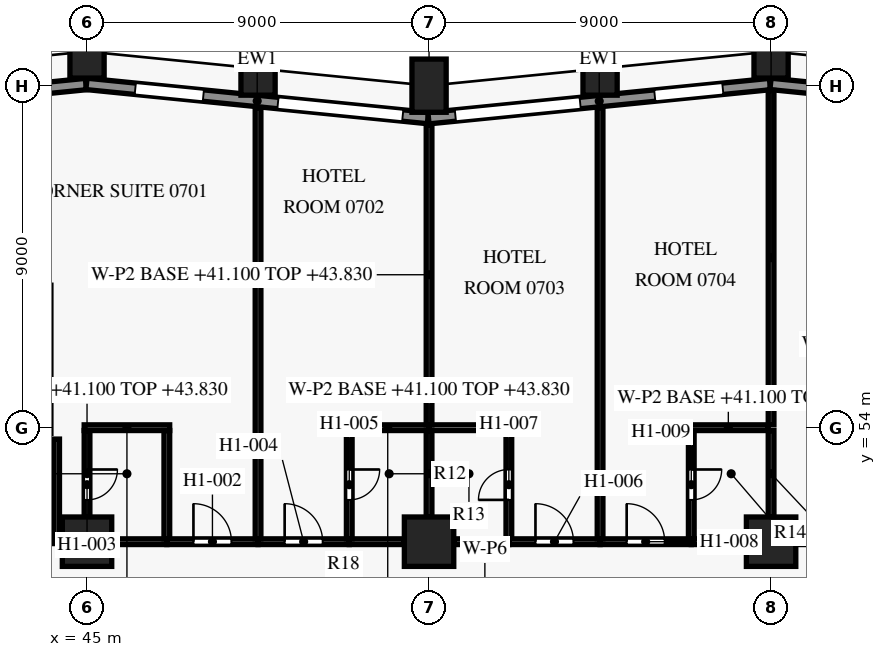
"""IFC4 building model, lengths in metres.
Left out: names, types, materials, properties, quantities, classifications, styles, units other than length and angle.
Written with IfcOpenShell. Run it as: python <this file> out.ifc"""

import sys

from ifc_helpers import new_model, si_unit, direction, frame, frame_2d, origin, origin_2d, place, context, subcontext, project, spatial, rectangle, extrude, element, fill, save


model = new_model("IFC4")
c1 = context("Model", 3, precision=1e-05, world=origin(), true_north=direction((0.0, 1.0)))
c2 = subcontext(c1, "Body", "Model", "MODEL_VIEW")
j1 = project(units=[si_unit("LENGTHUNIT", "METRE"), si_unit("PLANEANGLEUNIT", "RADIAN")], contexts=[c1])
p1 = place(None, origin())
s1 = spatial("IfcSite", under=j1, at=p1, CompositionType="ELEMENT")
p2 = place(p1, origin())
s2 = spatial("IfcBuilding", under=s1, at=p2, CompositionType="ELEMENT")
p3 = place(p2, frame((0.0, 0.0, 41.1)))
s3 = spatial("IfcBuildingStorey", under=s2, at=p3, CompositionType="ELEMENT", Elevation=41.1)
for number, where, z_axis, x_axis in (
    (1, (63.0, 63.9, 0.0), (0.0, 0.0, 1.0), (-1.0, 0.0, 0.0)),
    (2, (58.5, 63.45, 0.0), (0.0, 0.0, 1.0), (-0.995, -0.1, 0.0)),
    (3, (54.0, 63.0, 0.0), (0.0, 0.0, 1.0), (-1.0, 0.0, 0.0)),
    (4, (49.5, 63.45, 0.0), (0.0, 0.0, 1.0), (-0.995, 0.1, 0.0)),
    (5, (45.0, 63.9, 0.0), (0.0, 0.0, 1.0), (-1.0, 0.0, 0.0)),
):
    element("IfcColumn", number, at=place(p3, frame(where, z_axis=z_axis, x_axis=x_axis)), inside=s3, PredefinedType="COLUMN", context=c2, shape_type="SweptSolid", body=[
        extrude(rectangle(XDim=0.9, YDim=1.4, at=origin_2d()), origin(), (0.0, 0.0, 1.0), 3.6),
    ])
for number, where, z_axis, x_axis in (
    (6, (45.0, 51.0, 0.0), (0.0, 0.0, 1.0), (1.0, 0.0, 0.0)),
    (7, (54.0, 51.0, 0.0), (0.0, 0.0, 1.0), (1.0, 0.0, 0.0)),
    (8, (63.0, 51.0, 0.0), (0.0, 0.0, 1.0), (1.0, 0.0, 0.0)),
):
    element("IfcColumn", number, at=place(p3, frame(where, z_axis=z_axis, x_axis=x_axis)), inside=s3, PredefinedType="COLUMN", context=c2, shape_type="SweptSolid", body=[
        extrude(rectangle(XDim=1.3, YDim=1.3, at=origin_2d()), origin(), (0.0, 0.0, 1.0), 3.6),
    ])
p4 = place(p3, frame((62.985, 63.047, 0.0), z_axis=(0.0, 0.0, 1.0), x_axis=(0.995031712439, -0.099558481511, 0.0)))
e9 = element("IfcWall", 9, at=p4, inside=s3, PredefinedType="SOLIDWALL", context=c2, shape_type="SweptSolid", body=[
    extrude(rectangle(XDim=3.531, YDim=0.3, at=frame_2d((1.766, 0.0))), origin(), (0.0, 0.0, 1.0), 2.95),
])
p5 = place(p4, frame((1.291, 0.0, 0.75)))
e10 = element("IfcOpeningElement", 10, at=p5, cuts=e9, PredefinedType="OPENING", context=c2, shape_type="SweptSolid", body=[
    extrude(rectangle(XDim=1.8, YDim=1.8, at=frame_2d((0.9, 0.9))), frame((0.0, 0.16, 0.0), z_axis=(0.0, -1.0, 0.0), x_axis=(1.0, 0.0, 0.0)), (0.0, 0.0, 1.0), 0.32),
])
p6 = place(p3, frame((53.985, 62.144, 0.0), z_axis=(0.0, 0.0, 1.0), x_axis=(0.995037993253, 0.099495688264, 0.0)))
e11 = element("IfcWall", 11, at=p6, inside=s3, PredefinedType="SOLIDWALL", context=c2, shape_type="SweptSolid", body=[
    extrude(rectangle(XDim=9.03, YDim=0.3, at=frame_2d((4.515, 0.0))), origin(), (0.0, 0.0, 1.0), 2.95),
])
p7 = place(p6, frame((0.711, 0.0, 0.15)))
e12 = element("IfcOpeningElement", 12, at=p7, cuts=e11, PredefinedType="OPENING", context=c2, shape_type="SweptSolid", body=[
    extrude(rectangle(XDim=3.3, YDim=2.4, at=frame_2d((1.65, 1.2))), frame((0.0, 0.16, 0.0), z_axis=(0.0, -1.0, 0.0), x_axis=(1.0, 0.0, 0.0)), (0.0, 0.0, 1.0), 0.32),
])
p8 = place(p6, frame((5.984, 0.0, 0.75)))
e13 = element("IfcOpeningElement", 13, at=p8, cuts=e11, PredefinedType="OPENING", context=c2, shape_type="SweptSolid", body=[
    extrude(rectangle(XDim=1.8, YDim=1.8, at=frame_2d((0.9, 0.9))), frame((0.0, 0.16, 0.0), z_axis=(0.0, -1.0, 0.0), x_axis=(1.0, 0.0, 0.0)), (0.0, 0.0, 1.0), 0.32),
])
p9 = place(p3, frame((44.985, 63.047, 0.0), z_axis=(0.0, 0.0, 1.0), x_axis=(0.995035316196, -0.099522457379, 0.0)))
e14 = element("IfcWall", 14, at=p9, inside=s3, PredefinedType="SOLIDWALL", context=c2, shape_type="SweptSolid", body=[
    extrude(rectangle(XDim=9.03, YDim=0.3, at=frame_2d((4.515, 0.0))), origin(), (0.0, 0.0, 1.0), 2.95),
])
p10 = place(p9, frame((1.291, 0.0, 0.75)))
e15 = element("IfcOpeningElement", 15, at=p10, cuts=e14, PredefinedType="OPENING", context=c2, shape_type="SweptSolid", body=[
    extrude(rectangle(XDim=1.8, YDim=1.8, at=frame_2d((0.9, 0.9))), frame((0.0, 0.16, 0.0), z_axis=(0.0, -1.0, 0.0), x_axis=(1.0, 0.0, 0.0)), (0.0, 0.0, 1.0), 0.32),
])
p11 = place(p9, frame((5.064, 0.0, 0.15)))
e16 = element("IfcOpeningElement", 16, at=p11, cuts=e14, PredefinedType="OPENING", context=c2, shape_type="SweptSolid", body=[
    extrude(rectangle(XDim=3.3, YDim=2.4, at=frame_2d((1.65, 1.2))), frame((0.0, 0.16, 0.0), z_axis=(0.0, -1.0, 0.0), x_axis=(1.0, 0.0, 0.0)), (0.0, 0.0, 1.0), 0.32),
])
p12 = place(p3, frame((35.985, 62.144, 0.0), z_axis=(0.0, 0.0, 1.0), x_axis=(0.995037993253, 0.099495688264, 0.0)))
e17 = element("IfcWall", 17, at=p12, inside=s3, PredefinedType="SOLIDWALL", context=c2, shape_type="SweptSolid", body=[
    extrude(rectangle(XDim=9.03, YDim=0.3, at=frame_2d((4.515, 0.0))), origin(), (0.0, 0.0, 1.0), 2.95),
])
p13 = place(p12, frame((0.711, 0.0, 0.15)))
e18 = element("IfcOpeningElement", 18, at=p13, cuts=e17, PredefinedType="OPENING", context=c2, shape_type="SweptSolid", body=[
    extrude(rectangle(XDim=3.3, YDim=2.4, at=frame_2d((1.65, 1.2))), frame((0.0, 0.16, 0.0), z_axis=(0.0, -1.0, 0.0), x_axis=(1.0, 0.0, 0.0)), (0.0, 0.0, 1.0), 0.32),
])
p14 = place(p12, frame((5.984, 0.0, 0.75)))
e19 = element("IfcOpeningElement", 19, at=p14, cuts=e17, PredefinedType="OPENING", context=c2, shape_type="SweptSolid", body=[
    extrude(rectangle(XDim=1.8, YDim=1.8, at=frame_2d((0.9, 0.9))), frame((0.0, 0.16, 0.0), z_axis=(0.0, -1.0, 0.0), x_axis=(1.0, 0.0, 0.0)), (0.0, 0.0, 1.0), 0.32),
])
p15 = place(p3, frame((44.33, 51.0, 0.0), z_axis=(0.0, 0.0, 1.0), x_axis=(-1.0, 0.0, 0.0)))
e20 = element("IfcWall", 20, at=p15, inside=s3, PredefinedType="PARTITIONING", context=c2, shape_type="SweptSolid", body=[
    extrude(rectangle(XDim=3.83, YDim=0.1, at=frame_2d((1.915, 0.0))), origin(), (0.0, 0.0, 1.0), 2.58),
])
p16 = place(p3, frame((45.655, 51.0, 0.0), z_axis=(0.0, 0.0, 1.0), x_axis=(1.0, 0.0, 0.0)))
e21 = element("IfcWall", 21, at=p16, inside=s3, PredefinedType="PARTITIONING", context=c2, shape_type="SweptSolid", body=[
    extrude(rectangle(XDim=1.445, YDim=0.15, at=frame_2d((0.723, 0.0))), origin(), (0.0, 0.0, 1.0), 2.58),
])
p17 = place(p3, frame((47.1, 51.0, 0.0), z_axis=(0.0, 0.0, 1.0), x_axis=(1.0, 0.0, 0.0)))
e22 = element("IfcWall", 22, at=p17, inside=s3, PredefinedType="PARTITIONING", context=c2, shape_type="SweptSolid", body=[
    extrude(rectangle(XDim=2.4, YDim=0.15, at=frame_2d((1.2, 0.0))), origin(), (0.0, 0.0, 1.0), 2.58),
])
p18 = place(p17, frame((0.7, 0.0, 0.0)))
e23 = element("IfcOpeningElement", 23, at=p18, cuts=e22, PredefinedType="OPENING", context=c2, shape_type="SweptSolid", body=[
    extrude(rectangle(XDim=1.0, YDim=2.1, at=frame_2d((0.5, 1.05))), frame((0.0, 0.085, 0.0), z_axis=(0.0, -1.0, 0.0), x_axis=(1.0, 0.0, 0.0)), (0.0, 0.0, 1.0), 0.17),
])
p19 = place(p3, frame((49.5, 51.0, 0.0), z_axis=(0.0, 0.0, 1.0), x_axis=(1.0, 0.0, 0.0)))
e24 = element("IfcWall", 24, at=p19, inside=s3, PredefinedType="PARTITIONING", context=c2, shape_type="SweptSolid", body=[
    extrude(rectangle(XDim=2.4, YDim=0.15, at=frame_2d((1.2, 0.0))), origin(), (0.0, 0.0, 1.0), 2.58),
])
p20 = place(p19, frame((0.7, 0.0, 0.0)))
e25 = element("IfcOpeningElement", 25, at=p20, cuts=e24, PredefinedType="OPENING", context=c2, shape_type="SweptSolid", body=[
    extrude(rectangle(XDim=1.0, YDim=2.1, at=frame_2d((0.5, 1.05))), frame((0.0, 0.085, 0.0), z_axis=(0.0, -1.0, 0.0), x_axis=(1.0, 0.0, 0.0)), (0.0, 0.0, 1.0), 0.17),
])
for number, where, z_axis, x_axis in (
    (26, (51.9, 51.0, 0.0), (0.0, 0.0, 1.0), (1.0, 0.0, 0.0)),
    (27, (54.655, 51.0, 0.0), (0.0, 0.0, 1.0), (1.0, 0.0, 0.0)),
):
    element("IfcWall", number, at=place(p3, frame(where, z_axis=z_axis, x_axis=x_axis)), inside=s3, PredefinedType="PARTITIONING", context=c2, shape_type="SweptSolid", body=[
        extrude(rectangle(XDim=1.445, YDim=0.15, at=frame_2d((0.723, 0.0))), origin(), (0.0, 0.0, 1.0), 2.58),
    ])
p21 = place(p3, frame((56.1, 51.0, 0.0), z_axis=(0.0, 0.0, 1.0), x_axis=(1.0, 0.0, 0.0)))
e28 = element("IfcWall", 28, at=p21, inside=s3, PredefinedType="PARTITIONING", context=c2, shape_type="SweptSolid", body=[
    extrude(rectangle(XDim=2.4, YDim=0.15, at=frame_2d((1.2, 0.0))), origin(), (0.0, 0.0, 1.0), 2.58),
])
p22 = place(p21, frame((0.7, 0.0, 0.0)))
e29 = element("IfcOpeningElement", 29, at=p22, cuts=e28, PredefinedType="OPENING", context=c2, shape_type="SweptSolid", body=[
    extrude(rectangle(XDim=1.0, YDim=2.1, at=frame_2d((0.5, 1.05))), frame((0.0, 0.085, 0.0), z_axis=(0.0, -1.0, 0.0), x_axis=(1.0, 0.0, 0.0)), (0.0, 0.0, 1.0), 0.17),
])
p23 = place(p3, frame((58.5, 51.0, 0.0), z_axis=(0.0, 0.0, 1.0), x_axis=(1.0, 0.0, 0.0)))
e30 = element("IfcWall", 30, at=p23, inside=s3, PredefinedType="PARTITIONING", context=c2, shape_type="SweptSolid", body=[
    extrude(rectangle(XDim=2.4, YDim=0.15, at=frame_2d((1.2, 0.0))), origin(), (0.0, 0.0, 1.0), 2.58),
])
p24 = place(p23, frame((0.7, 0.0, 0.0)))
e31 = element("IfcOpeningElement", 31, at=p24, cuts=e30, PredefinedType="OPENING", context=c2, shape_type="SweptSolid", body=[
    extrude(rectangle(XDim=1.0, YDim=2.1, at=frame_2d((0.5, 1.05))), frame((0.0, 0.085, 0.0), z_axis=(0.0, -1.0, 0.0), x_axis=(1.0, 0.0, 0.0)), (0.0, 0.0, 1.0), 0.17),
])
p25 = place(p3, frame((60.9, 51.0, 0.0), z_axis=(0.0, 0.0, 1.0), x_axis=(1.0, 0.0, 0.0)))
e32 = element("IfcWall", 32, at=p25, inside=s3, PredefinedType="PARTITIONING", context=c2, shape_type="SweptSolid", body=[
    extrude(rectangle(XDim=1.445, YDim=0.15, at=frame_2d((0.723, 0.0))), origin(), (0.0, 0.0, 1.0), 2.58),
])
p26 = place(p3, frame((63.655, 51.0, 0.0), z_axis=(0.0, 0.0, 1.0), x_axis=(1.0, 0.0, 0.0)))
e33 = element("IfcWall", 33, at=p26, inside=s3, PredefinedType="PARTITIONING", context=c2, shape_type="SweptSolid", body=[
    extrude(rectangle(XDim=1.22, YDim=0.15, at=frame_2d((0.61, 0.0))), origin(), (0.0, 0.0, 1.0), 2.58),
])
p27 = place(p3, frame((47.1, 51.075, 0.0), z_axis=(0.0, 0.0, 1.0), x_axis=(0.0, 1.0, 0.0)))
e34 = element("IfcWall", 34, at=p27, inside=s3, PredefinedType="PARTITIONING", context=c2, shape_type="SweptSolid", body=[
    extrude(rectangle(XDim=2.85, YDim=0.15, at=frame_2d((1.425, 0.0))), origin(), (0.0, 0.0, 1.0), 2.58),
])
p28 = place(p3, frame((56.1, 51.075, 0.0), z_axis=(0.0, 0.0, 1.0), x_axis=(0.0, 1.0, 0.0)))
e35 = element("IfcWall", 35, at=p28, inside=s3, PredefinedType="PARTITIONING", context=c2, shape_type="SweptSolid", body=[
    extrude(rectangle(XDim=2.85, YDim=0.15, at=frame_2d((1.425, 0.0))), origin(), (0.0, 0.0, 1.0), 2.58),
])
p29 = place(p28, frame((1.025, 0.0, 0.0)))
e36 = element("IfcOpeningElement", 36, at=p29, cuts=e35, PredefinedType="OPENING", context=c2, shape_type="SweptSolid", body=[
    extrude(rectangle(XDim=0.8, YDim=2.1, at=frame_2d((0.4, 1.05))), frame((0.0, 0.085, 0.0), z_axis=(0.0, -1.0, 0.0), x_axis=(1.0, 0.0, 0.0)), (0.0, 0.0, 1.0), 0.17),
])
p30 = place(p3, frame((44.2, 53.7, 0.0), z_axis=(0.0, 0.0, 1.0), x_axis=(0.0, -1.0, 0.0)))
e37 = element("IfcWall", 37, at=p30, inside=s3, PredefinedType="PARTITIONING", context=c2, shape_type="SweptSolid", body=[
    extrude(rectangle(XDim=2.625, YDim=0.15, at=frame_2d((1.312, 0.0))), origin(), (0.0, 0.0, 1.0), 2.58),
])
p31 = place(p3, frame((45.0, 53.925, 0.0), z_axis=(0.0, 0.0, 1.0), x_axis=(0.0, -1.0, 0.0)))
e38 = element("IfcWall", 38, at=p31, inside=s3, PredefinedType="PARTITIONING", context=c2, shape_type="SweptSolid", body=[
    extrude(rectangle(XDim=2.27, YDim=0.15, at=frame_2d((1.135, 0.0))), origin(), (0.0, 0.0, 1.0), 2.73),
])
p32 = place(p31, frame((1.025, 0.0, 0.0)))
e39 = element("IfcOpeningElement", 39, at=p32, cuts=e38, PredefinedType="OPENING", context=c2, shape_type="SweptSolid", body=[
    extrude(rectangle(XDim=0.8, YDim=2.1, at=frame_2d((0.4, 1.05))), frame((0.0, 0.085, 0.0), z_axis=(0.0, -1.0, 0.0), x_axis=(1.0, 0.0, 0.0)), (0.0, 0.0, 1.0), 0.17),
])
p33 = place(p3, frame((51.9, 53.925, 0.0), z_axis=(0.0, 0.0, 1.0), x_axis=(0.0, -1.0, 0.0)))
e40 = element("IfcWall", 40, at=p33, inside=s3, PredefinedType="PARTITIONING", context=c2, shape_type="SweptSolid", body=[
    extrude(rectangle(XDim=2.85, YDim=0.15, at=frame_2d((1.425, 0.0))), origin(), (0.0, 0.0, 1.0), 2.58),
])
p34 = place(p33, frame((1.025, 0.0, 0.0)))
e41 = element("IfcOpeningElement", 41, at=p34, cuts=e40, PredefinedType="OPENING", context=c2, shape_type="SweptSolid", body=[
    extrude(rectangle(XDim=0.8, YDim=2.1, at=frame_2d((0.4, 1.05))), frame((0.0, 0.085, 0.0), z_axis=(0.0, -1.0, 0.0), x_axis=(1.0, 0.0, 0.0)), (0.0, 0.0, 1.0), 0.17),
])
p35 = place(p3, frame((54.0, 53.925, 0.0), z_axis=(0.0, 0.0, 1.0), x_axis=(0.0, -1.0, 0.0)))
e42 = element("IfcWall", 42, at=p35, inside=s3, PredefinedType="PARTITIONING", context=c2, shape_type="SweptSolid", body=[
    extrude(rectangle(XDim=2.27, YDim=0.15, at=frame_2d((1.135, 0.0))), origin(), (0.0, 0.0, 1.0), 2.73),
])
p36 = place(p3, frame((60.9, 53.925, 0.0), z_axis=(0.0, 0.0, 1.0), x_axis=(0.0, -1.0, 0.0)))
e43 = element("IfcWall", 43, at=p36, inside=s3, PredefinedType="PARTITIONING", context=c2, shape_type="SweptSolid", body=[
    extrude(rectangle(XDim=2.85, YDim=0.15, at=frame_2d((1.425, 0.0))), origin(), (0.0, 0.0, 1.0), 2.58),
])
p37 = place(p36, frame((1.025, 0.0, 0.0)))
e44 = element("IfcOpeningElement", 44, at=p37, cuts=e43, PredefinedType="OPENING", context=c2, shape_type="SweptSolid", body=[
    extrude(rectangle(XDim=0.8, YDim=2.1, at=frame_2d((0.4, 1.05))), frame((0.0, 0.085, 0.0), z_axis=(0.0, -1.0, 0.0), x_axis=(1.0, 0.0, 0.0)), (0.0, 0.0, 1.0), 0.17),
])
p38 = place(p3, frame((63.0, 53.925, 0.0), z_axis=(0.0, 0.0, 1.0), x_axis=(0.0, -1.0, 0.0)))
e45 = element("IfcWall", 45, at=p38, inside=s3, PredefinedType="PARTITIONING", context=c2, shape_type="SweptSolid", body=[
    extrude(rectangle(XDim=2.27, YDim=0.15, at=frame_2d((1.135, 0.0))), origin(), (0.0, 0.0, 1.0), 2.73),
])
p39 = place(p3, frame((47.175, 54.0, 0.0), z_axis=(0.0, 0.0, 1.0), x_axis=(-1.0, 0.0, 0.0)))
e46 = element("IfcWall", 46, at=p39, inside=s3, PredefinedType="PARTITIONING", context=c2, shape_type="SweptSolid", body=[
    extrude(rectangle(XDim=2.25, YDim=0.15, at=frame_2d((1.125, 0.0))), origin(), (0.0, 0.0, 1.0), 2.73),
])
for number, where, z_axis, x_axis in (
    (47, (54.0, 54.0, 0.0), (0.0, 0.0, 1.0), (-1.0, 0.0, 0.0)),
    (48, (56.175, 54.0, 0.0), (0.0, 0.0, 1.0), (-1.0, 0.0, 0.0)),
):
    element("IfcWall", number, at=place(p3, frame(where, z_axis=z_axis, x_axis=x_axis)), inside=s3, PredefinedType="PARTITIONING", context=c2, shape_type="SweptSolid", body=[
        extrude(rectangle(XDim=2.175, YDim=0.15, at=frame_2d((1.087, 0.0))), origin(), (0.0, 0.0, 1.0), 2.73),
    ])
p40 = place(p3, frame((62.925, 54.0, 0.0), z_axis=(0.0, 0.0, 1.0), x_axis=(-1.0, 0.0, 0.0)))
e49 = element("IfcWall", 49, at=p40, inside=s3, PredefinedType="PARTITIONING", context=c2, shape_type="SweptSolid", body=[
    extrude(rectangle(XDim=2.1, YDim=0.15, at=frame_2d((1.05, 0.0))), origin(), (0.0, 0.0, 1.0), 2.73),
])
p41 = place(p3, frame((54.0, 61.975, 0.0), z_axis=(0.0, 0.0, 1.0), x_axis=(0.0, -1.0, 0.0)))
e50 = element("IfcWall", 50, at=p41, inside=s3, PredefinedType="PARTITIONING", context=c2, shape_type="SweptSolid", body=[
    extrude(rectangle(XDim=7.9, YDim=0.15, at=frame_2d((3.95, 0.0))), origin(), (0.0, 0.0, 1.0), 2.73),
])
for number, where, z_axis, x_axis in (
    (51, (49.5, 62.425, 0.0), (0.0, 0.0, 1.0), (0.0, -1.0, 0.0)),
    (52, (58.5, 62.425, 0.0), (0.0, 0.0, 1.0), (0.0, -1.0, 0.0)),
):
    element("IfcWall", number, at=place(p3, frame(where, z_axis=z_axis, x_axis=x_axis)), inside=s3, PredefinedType="PARTITIONING", context=c2, shape_type="SweptSolid", body=[
        extrude(rectangle(XDim=11.35, YDim=0.15, at=frame_2d((5.675, 0.0))), origin(), (0.0, 0.0, 1.0), 2.58),
    ])
p42 = place(p3, frame((63.0, 62.875, 0.0), z_axis=(0.0, 0.0, 1.0), x_axis=(0.0, -1.0, 0.0)))
e53 = element("IfcWall", 53, at=p42, inside=s3, PredefinedType="PARTITIONING", context=c2, shape_type="SweptSolid", body=[
    extrude(rectangle(XDim=8.8, YDim=0.15, at=frame_2d((4.4, 0.0))), origin(), (0.0, 0.0, 1.0), 2.73),
])
p43 = place(p7, origin())
e54 = element("IfcWindow", 54, at=p43, inside=s3, PartitioningType="SINGLE_PANEL", PredefinedType="WINDOW", context=c2, shape_type="SweptSolid", body=[
    extrude(rectangle(XDim=3.3, YDim=2.4, at=frame_2d((1.65, 1.2))), frame((0.0, 0.03, 0.0), z_axis=(0.0, -1.0, 0.0), x_axis=(1.0, 0.0, 0.0)), (0.0, 0.0, 1.0), 0.06),
])
fill(e12, e54)
p44 = place(p8, origin())
e55 = element("IfcWindow", 55, at=p44, inside=s3, PartitioningType="SINGLE_PANEL", PredefinedType="WINDOW", context=c2, shape_type="SweptSolid", body=[
    extrude(rectangle(XDim=1.8, YDim=1.8, at=frame_2d((0.9, 0.9))), frame((0.0, 0.03, 0.0), z_axis=(0.0, -1.0, 0.0), x_axis=(1.0, 0.0, 0.0)), (0.0, 0.0, 1.0), 0.06),
])
fill(e13, e55)
p45 = place(p10, origin())
e56 = element("IfcWindow", 56, at=p45, inside=s3, PartitioningType="SINGLE_PANEL", PredefinedType="WINDOW", context=c2, shape_type="SweptSolid", body=[
    extrude(rectangle(XDim=1.8, YDim=1.8, at=frame_2d((0.9, 0.9))), frame((0.0, 0.03, 0.0), z_axis=(0.0, -1.0, 0.0), x_axis=(1.0, 0.0, 0.0)), (0.0, 0.0, 1.0), 0.06),
])
fill(e15, e56)
p46 = place(p11, origin())
e57 = element("IfcWindow", 57, at=p46, inside=s3, PartitioningType="SINGLE_PANEL", PredefinedType="WINDOW", context=c2, shape_type="SweptSolid", body=[
    extrude(rectangle(XDim=3.3, YDim=2.4, at=frame_2d((1.65, 1.2))), frame((0.0, 0.03, 0.0), z_axis=(0.0, -1.0, 0.0), x_axis=(1.0, 0.0, 0.0)), (0.0, 0.0, 1.0), 0.06),
])
fill(e16, e57)
p47 = place(p18, origin())
e58 = element("IfcDoor", 58, at=p47, inside=s3, OperationType="SINGLE_SWING_LEFT", PredefinedType="DOOR", context=c2, shape_type="SweptSolid", body=[
    extrude(rectangle(XDim=1.0, YDim=2.1, at=frame_2d((0.5, 1.05))), frame((0.0, 0.025, 0.0), z_axis=(0.0, -1.0, 0.0), x_axis=(1.0, 0.0, 0.0)), (0.0, 0.0, 1.0), 0.05),
])
fill(e23, e58)
p48 = place(p32, origin())
e59 = element("IfcDoor", 59, at=p48, inside=s3, OperationType="SINGLE_SWING_RIGHT", PredefinedType="DOOR", context=c2, shape_type="SweptSolid", body=[
    extrude(rectangle(XDim=0.8, YDim=2.1, at=frame_2d((0.4, 1.05))), frame((0.0, 0.025, 0.0), z_axis=(0.0, -1.0, 0.0), x_axis=(1.0, 0.0, 0.0)), (0.0, 0.0, 1.0), 0.05),
])
fill(e39, e59)
p49 = place(p20, origin())
e60 = element("IfcDoor", 60, at=p49, inside=s3, OperationType="SINGLE_SWING_LEFT", PredefinedType="DOOR", context=c2, shape_type="SweptSolid", body=[
    extrude(rectangle(XDim=1.0, YDim=2.1, at=frame_2d((0.5, 1.05))), frame((0.0, 0.025, 0.0), z_axis=(0.0, -1.0, 0.0), x_axis=(1.0, 0.0, 0.0)), (0.0, 0.0, 1.0), 0.05),
])
fill(e25, e60)
p50 = place(p34, origin())
e61 = element("IfcDoor", 61, at=p50, inside=s3, OperationType="SINGLE_SWING_LEFT", PredefinedType="DOOR", context=c2, shape_type="SweptSolid", body=[
    extrude(rectangle(XDim=0.8, YDim=2.1, at=frame_2d((0.4, 1.05))), frame((0.0, 0.025, 0.0), z_axis=(0.0, -1.0, 0.0), x_axis=(1.0, 0.0, 0.0)), (0.0, 0.0, 1.0), 0.05),
])
fill(e41, e61)
p51 = place(p22, origin())
e62 = element("IfcDoor", 62, at=p51, inside=s3, OperationType="SINGLE_SWING_LEFT", PredefinedType="DOOR", context=c2, shape_type="SweptSolid", body=[
    extrude(rectangle(XDim=1.0, YDim=2.1, at=frame_2d((0.5, 1.05))), frame((0.0, 0.025, 0.0), z_axis=(0.0, -1.0, 0.0), x_axis=(1.0, 0.0, 0.0)), (0.0, 0.0, 1.0), 0.05),
])
fill(e29, e62)
p52 = place(p29, origin())
e63 = element("IfcDoor", 63, at=p52, inside=s3, OperationType="SINGLE_SWING_LEFT", PredefinedType="DOOR", context=c2, shape_type="SweptSolid", body=[
    extrude(rectangle(XDim=0.8, YDim=2.1, at=frame_2d((0.4, 1.05))), frame((0.0, 0.025, 0.0), z_axis=(0.0, -1.0, 0.0), x_axis=(1.0, 0.0, 0.0)), (0.0, 0.0, 1.0), 0.05),
])
fill(e36, e63)
p53 = place(p24, origin())
e64 = element("IfcDoor", 64, at=p53, inside=s3, OperationType="SINGLE_SWING_LEFT", PredefinedType="DOOR", context=c2, shape_type="SweptSolid", body=[
    extrude(rectangle(XDim=1.0, YDim=2.1, at=frame_2d((0.5, 1.05))), frame((0.0, 0.025, 0.0), z_axis=(0.0, -1.0, 0.0), x_axis=(1.0, 0.0, 0.0)), (0.0, 0.0, 1.0), 0.05),
])
fill(e31, e64)
p54 = place(p37, origin())
e65 = element("IfcDoor", 65, at=p54, inside=s3, OperationType="SINGLE_SWING_LEFT", PredefinedType="DOOR", context=c2, shape_type="SweptSolid", body=[
    extrude(rectangle(XDim=0.8, YDim=2.1, at=frame_2d((0.4, 1.05))), frame((0.0, 0.025, 0.0), z_axis=(0.0, -1.0, 0.0), x_axis=(1.0, 0.0, 0.0)), (0.0, 0.0, 1.0), 0.05),
])
fill(e44, e65)
save(model, sys.argv[1])
